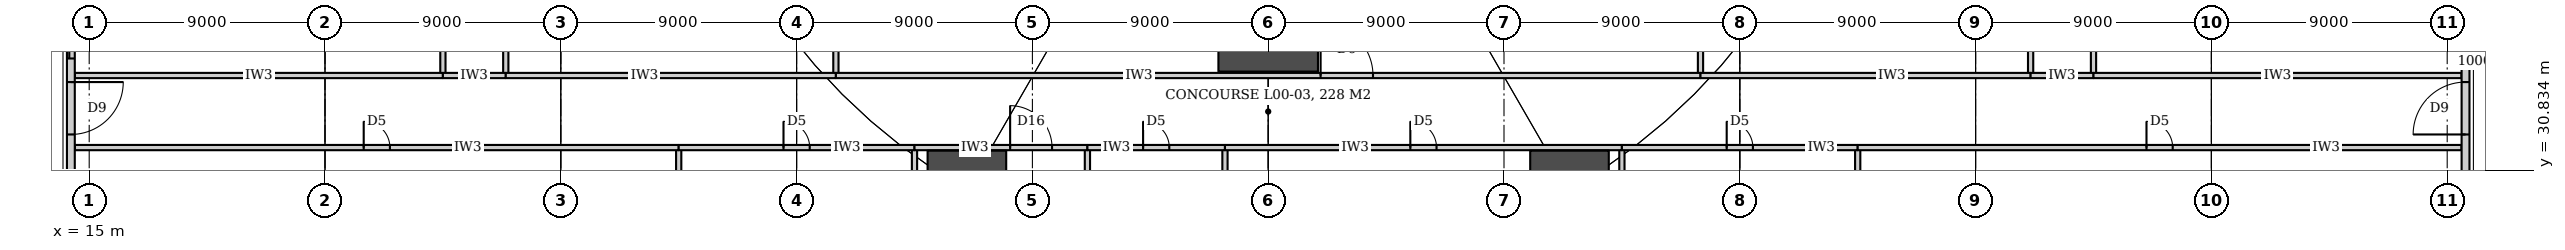
"""IFC4 building model, lengths in metres.
Left out: names, types, materials, properties, quantities, classifications, styles, units other than length and angle.
Written with IfcOpenShell. Run it as: python <this file> out.ifc"""

import sys

from ifc_helpers import new_model, si_unit, direction, frame, frame_2d, origin, origin_2d, place, context, subcontext, project, spatial, rectangle, circle, extrude, element, fill, save


model = new_model("IFC4")
c1 = context("Model", 3, precision=1e-05, world=origin(), true_north=direction((0.0, 1.0)))
c2 = subcontext(c1, "Body", "Model", "MODEL_VIEW")
j1 = project(units=[si_unit("LENGTHUNIT", "METRE"), si_unit("PLANEANGLEUNIT", "RADIAN")], contexts=[c1])
p1 = place(None, origin())
s1 = spatial("IfcSite", under=j1, at=p1, CompositionType="ELEMENT")
p2 = place(p1, origin())
s2 = spatial("IfcBuilding", under=s1, at=p2, CompositionType="ELEMENT")
p3 = place(p2, origin())
s3 = spatial("IfcBuildingStorey", under=s2, at=p3, CompositionType="ELEMENT", Elevation=0.0)
for number, where, z_axis, x_axis in (
    (1, (48.5, 30.081, 0.0), (0.0, 0.0, 1.0), (1.0, 0.0, 0.0)),
    (2, (71.5, 30.081, 0.0), (0.0, 0.0, 1.0), (1.0, 0.0, 0.0)),
):
    element("IfcColumn", number, at=place(p3, frame(where, z_axis=z_axis, x_axis=x_axis)), inside=s3, PredefinedType="COLUMN", context=c2, shape_type="SweptSolid", body=[
        extrude(circle(Radius=1.5, at=origin_2d()), origin(), (0.0, 0.0, 1.0), 6.0),
    ])
p4 = place(p3, frame((60.0, 36.5, 0.0), z_axis=(0.0, 0.0, 1.0), x_axis=(1.0, 0.0, 0.0)))
e3 = element("IfcColumn", 3, at=p4, inside=s3, PredefinedType="COLUMN", context=c2, shape_type="SweptSolid", body=[
    extrude(circle(Radius=1.9, at=origin_2d()), origin(), (0.0, 0.0, 1.0), 6.0),
])
p5 = place(p3, frame((28.5, 34.45, 0.0), z_axis=(0.0, 0.0, 1.0), x_axis=(0.0, 1.0, 0.0)))
e4 = element("IfcWall", 4, at=p5, inside=s3, PredefinedType="PARTITIONING", context=c2, shape_type="SweptSolid", body=[
    extrude(rectangle(XDim=31.65, YDim=0.2, at=frame_2d((15.825, 0.0))), origin(), (0.0, 0.0, 1.0), 3.68),
])
p6 = place(p5, frame((15.325, 0.0, 0.0)))
e5 = element("IfcOpeningElement", 5, at=p6, cuts=e4, PredefinedType="OPENING", context=c2, shape_type="SweptSolid", body=[
    extrude(rectangle(XDim=1.0, YDim=2.1, at=frame_2d((0.5, 1.05))), frame((0.0, 0.11, 0.0), z_axis=(0.0, -1.0, 0.0), x_axis=(1.0, 0.0, 0.0)), (0.0, 0.0, 1.0), 0.22),
])
p7 = place(p3, frame((30.9, 34.45, 0.0), z_axis=(0.0, 0.0, 1.0), x_axis=(0.0, 1.0, 0.0)))
e6 = element("IfcWall", 6, at=p7, inside=s3, PredefinedType="PARTITIONING", context=c2, shape_type="SweptSolid", body=[
    extrude(rectangle(XDim=13.9, YDim=0.2, at=frame_2d((6.95, 0.0))), origin(), (0.0, 0.0, 1.0), 3.68),
])
p8 = place(p7, frame((6.45, 0.0, 0.0)))
e7 = element("IfcOpeningElement", 7, at=p8, cuts=e6, PredefinedType="OPENING", context=c2, shape_type="SweptSolid", body=[
    extrude(rectangle(XDim=1.0, YDim=2.1, at=frame_2d((0.5, 1.05))), frame((0.0, 0.11, 0.0), z_axis=(0.0, -1.0, 0.0), x_axis=(1.0, 0.0, 0.0)), (0.0, 0.0, 1.0), 0.22),
])
p9 = place(p3, frame((37.5, 19.335, 0.0), z_axis=(0.0, 0.0, 1.0), x_axis=(0.0, 1.0, 0.0)))
e8 = element("IfcWall", 8, at=p9, inside=s3, PredefinedType="PARTITIONING", context=c2, shape_type="SweptSolid", body=[
    extrude(rectangle(XDim=12.365, YDim=0.2, at=frame_2d((6.183, 0.0))), origin(), (0.0, 0.0, 1.0), 3.68),
])
p10 = place(p3, frame((43.5, 34.45, 0.0), z_axis=(0.0, 0.0, 1.0), x_axis=(0.0, 1.0, 0.0)))
e9 = element("IfcWall", 9, at=p10, inside=s3, PredefinedType="PARTITIONING", context=c2, shape_type="SweptSolid", body=[
    extrude(rectangle(XDim=13.9, YDim=0.2, at=frame_2d((6.95, 0.0))), origin(), (0.0, 0.0, 1.0), 3.08),
])
p11 = place(p3, frame((46.5, 19.335, 0.0), z_axis=(0.0, 0.0, 1.0), x_axis=(0.0, 1.0, 0.0)))
e10 = element("IfcWall", 10, at=p11, inside=s3, PredefinedType="PARTITIONING", context=c2, shape_type="SweptSolid", body=[
    extrude(rectangle(XDim=12.365, YDim=0.2, at=frame_2d((6.183, 0.0))), origin(), (0.0, 0.0, 1.0), 3.68),
])
for number, where, z_axis, x_axis in (
    (11, (53.1, 19.455, 0.0), (0.0, 0.0, 1.0), (0.0, 1.0, 0.0)),
    (12, (58.35, 19.455, 0.0), (0.0, 0.0, 1.0), (0.0, 1.0, 0.0)),
):
    element("IfcWall", number, at=place(p3, frame(where, z_axis=z_axis, x_axis=x_axis)), inside=s3, PredefinedType="PARTITIONING", context=c2, shape_type="SweptSolid", body=[
        extrude(rectangle(XDim=12.245, YDim=0.2, at=frame_2d((6.123, 0.0))), origin(), (0.0, 0.0, 1.0), 3.68),
    ])
p12 = place(p3, frame((73.5, 19.335, 0.0), z_axis=(0.0, 0.0, 1.0), x_axis=(0.0, 1.0, 0.0)))
e13 = element("IfcWall", 13, at=p12, inside=s3, PredefinedType="PARTITIONING", context=c2, shape_type="SweptSolid", body=[
    extrude(rectangle(XDim=12.365, YDim=0.2, at=frame_2d((6.183, 0.0))), origin(), (0.0, 0.0, 1.0), 3.68),
])
p13 = place(p3, frame((76.5, 34.45, 0.0), z_axis=(0.0, 0.0, 1.0), x_axis=(0.0, 1.0, 0.0)))
e14 = element("IfcWall", 14, at=p13, inside=s3, PredefinedType="PARTITIONING", context=c2, shape_type="SweptSolid", body=[
    extrude(rectangle(XDim=13.9, YDim=0.2, at=frame_2d((6.95, 0.0))), origin(), (0.0, 0.0, 1.0), 3.08),
])
p14 = place(p3, frame((82.5, 19.335, 0.0), z_axis=(0.0, 0.0, 1.0), x_axis=(0.0, 1.0, 0.0)))
e15 = element("IfcWall", 15, at=p14, inside=s3, PredefinedType="PARTITIONING", context=c2, shape_type="SweptSolid", body=[
    extrude(rectangle(XDim=12.365, YDim=0.2, at=frame_2d((6.183, 0.0))), origin(), (0.0, 0.0, 1.0), 3.68),
])
p15 = place(p3, frame((89.1, 34.45, 0.0), z_axis=(0.0, 0.0, 1.0), x_axis=(0.0, 1.0, 0.0)))
e16 = element("IfcWall", 16, at=p15, inside=s3, PredefinedType="PARTITIONING", context=c2, shape_type="SweptSolid", body=[
    extrude(rectangle(XDim=13.9, YDim=0.2, at=frame_2d((6.95, 0.0))), origin(), (0.0, 0.0, 1.0), 3.68),
])
p16 = place(p15, frame((6.45, 0.0, 0.0)))
e17 = element("IfcOpeningElement", 17, at=p16, cuts=e16, PredefinedType="OPENING", context=c2, shape_type="SweptSolid", body=[
    extrude(rectangle(XDim=1.0, YDim=2.1, at=frame_2d((0.5, 1.05))), frame((0.0, 0.11, 0.0), z_axis=(0.0, -1.0, 0.0), x_axis=(1.0, 0.0, 0.0)), (0.0, 0.0, 1.0), 0.22),
])
p17 = place(p3, frame((91.5, 34.45, 0.0), z_axis=(0.0, 0.0, 1.0), x_axis=(0.0, 1.0, 0.0)))
e18 = element("IfcWall", 18, at=p17, inside=s3, PredefinedType="PARTITIONING", context=c2, shape_type="SweptSolid", body=[
    extrude(rectangle(XDim=33.85, YDim=0.2, at=frame_2d((16.925, 0.0))), origin(), (0.0, 0.0, 1.0), 3.68),
])
p18 = place(p17, frame((15.725, 0.0, 0.0)))
e19 = element("IfcOpeningElement", 19, at=p18, cuts=e18, PredefinedType="OPENING", context=c2, shape_type="SweptSolid", body=[
    extrude(rectangle(XDim=2.4, YDim=2.7, at=frame_2d((1.2, 1.35))), frame((0.0, 0.11, 0.0), z_axis=(0.0, -1.0, 0.0), x_axis=(1.0, 0.0, 0.0)), (0.0, 0.0, 1.0), 0.22),
])
p19 = place(p3, frame((14.455, 31.7, 0.0), z_axis=(0.0, 0.0, 1.0), x_axis=(1.0, 0.0, 0.0)))
e20 = element("IfcWall", 20, at=p19, inside=s3, PredefinedType="PARTITIONING", context=c2, shape_type="SweptSolid", body=[
    extrude(rectangle(XDim=23.045, YDim=0.2, at=frame_2d((11.522, 0.0))), origin(), (0.0, 0.0, 1.0), 3.68),
])
p20 = place(p19, frame((11.022, 0.0, 0.0)))
e21 = element("IfcOpeningElement", 21, at=p20, cuts=e20, PredefinedType="OPENING", context=c2, shape_type="SweptSolid", body=[
    extrude(rectangle(XDim=1.0, YDim=2.1, at=frame_2d((0.5, 1.05))), frame((0.0, 0.11, 0.0), z_axis=(0.0, -1.0, 0.0), x_axis=(1.0, 0.0, 0.0)), (0.0, 0.0, 1.0), 0.22),
])
p21 = place(p3, frame((37.5, 31.7, 0.0), z_axis=(0.0, 0.0, 1.0), x_axis=(1.0, 0.0, 0.0)))
e22 = element("IfcWall", 22, at=p21, inside=s3, PredefinedType="PARTITIONING", context=c2, shape_type="SweptSolid", body=[
    extrude(rectangle(XDim=9.0, YDim=0.2, at=frame_2d((4.5, 0.0))), origin(), (0.0, 0.0, 1.0), 3.68),
])
p22 = place(p21, frame((4.0, 0.0, 0.0)))
e23 = element("IfcOpeningElement", 23, at=p22, cuts=e22, PredefinedType="OPENING", context=c2, shape_type="SweptSolid", body=[
    extrude(rectangle(XDim=1.0, YDim=2.1, at=frame_2d((0.5, 1.05))), frame((0.0, 0.11, 0.0), z_axis=(0.0, -1.0, 0.0), x_axis=(1.0, 0.0, 0.0)), (0.0, 0.0, 1.0), 0.22),
])
p23 = place(p3, frame((46.5, 31.7, 0.0), z_axis=(0.0, 0.0, 1.0), x_axis=(1.0, 0.0, 0.0)))
e24 = element("IfcWall", 24, at=p23, inside=s3, PredefinedType="PARTITIONING", context=c2, shape_type="SweptSolid", body=[
    extrude(rectangle(XDim=6.6, YDim=0.2, at=frame_2d((3.3, 0.0))), origin(), (0.0, 0.0, 1.0), 3.08),
])
p24 = place(p23, frame((3.65, 0.0, 0.0)))
e25 = element("IfcOpeningElement", 25, at=p24, cuts=e24, PredefinedType="OPENING", context=c2, shape_type="SweptSolid", body=[
    extrude(rectangle(XDim=1.6, YDim=2.4, at=frame_2d((0.8, 1.2))), frame((0.0, 0.11, 0.0), z_axis=(0.0, -1.0, 0.0), x_axis=(1.0, 0.0, 0.0)), (0.0, 0.0, 1.0), 0.22),
])
p25 = place(p3, frame((53.1, 31.7, 0.0), z_axis=(0.0, 0.0, 1.0), x_axis=(1.0, 0.0, 0.0)))
e26 = element("IfcWall", 26, at=p25, inside=s3, PredefinedType="PARTITIONING", context=c2, shape_type="SweptSolid", body=[
    extrude(rectangle(XDim=5.25, YDim=0.2, at=frame_2d((2.625, 0.0))), origin(), (0.0, 0.0, 1.0), 3.68),
])
p26 = place(p25, frame((2.125, 0.0, 0.0)))
e27 = element("IfcOpeningElement", 27, at=p26, cuts=e26, PredefinedType="OPENING", context=c2, shape_type="SweptSolid", body=[
    extrude(rectangle(XDim=1.0, YDim=2.1, at=frame_2d((0.5, 1.05))), frame((0.0, 0.11, 0.0), z_axis=(0.0, -1.0, 0.0), x_axis=(1.0, 0.0, 0.0)), (0.0, 0.0, 1.0), 0.22),
])
p27 = place(p3, frame((58.35, 31.7, 0.0), z_axis=(0.0, 0.0, 1.0), x_axis=(1.0, 0.0, 0.0)))
e28 = element("IfcWall", 28, at=p27, inside=s3, PredefinedType="PARTITIONING", context=c2, shape_type="SweptSolid", body=[
    extrude(rectangle(XDim=15.15, YDim=0.2, at=frame_2d((7.575, 0.0))), origin(), (0.0, 0.0, 1.0), 3.08),
])
p28 = place(p27, frame((7.075, 0.0, 0.0)))
e29 = element("IfcOpeningElement", 29, at=p28, cuts=e28, PredefinedType="OPENING", context=c2, shape_type="SweptSolid", body=[
    extrude(rectangle(XDim=1.0, YDim=2.1, at=frame_2d((0.5, 1.05))), frame((0.0, 0.11, 0.0), z_axis=(0.0, -1.0, 0.0), x_axis=(1.0, 0.0, 0.0)), (0.0, 0.0, 1.0), 0.22),
])
p29 = place(p3, frame((73.5, 31.7, 0.0), z_axis=(0.0, 0.0, 1.0), x_axis=(1.0, 0.0, 0.0)))
e30 = element("IfcWall", 30, at=p29, inside=s3, PredefinedType="PARTITIONING", context=c2, shape_type="SweptSolid", body=[
    extrude(rectangle(XDim=9.0, YDim=0.2, at=frame_2d((4.5, 0.0))), origin(), (0.0, 0.0, 1.0), 3.68),
])
p30 = place(p29, frame((4.0, 0.0, 0.0)))
e31 = element("IfcOpeningElement", 31, at=p30, cuts=e30, PredefinedType="OPENING", context=c2, shape_type="SweptSolid", body=[
    extrude(rectangle(XDim=1.0, YDim=2.1, at=frame_2d((0.5, 1.05))), frame((0.0, 0.11, 0.0), z_axis=(0.0, -1.0, 0.0), x_axis=(1.0, 0.0, 0.0)), (0.0, 0.0, 1.0), 0.22),
])
p31 = place(p3, frame((82.5, 31.7, 0.0), z_axis=(0.0, 0.0, 1.0), x_axis=(1.0, 0.0, 0.0)))
e32 = element("IfcWall", 32, at=p31, inside=s3, PredefinedType="PARTITIONING", context=c2, shape_type="SweptSolid", body=[
    extrude(rectangle(XDim=23.045, YDim=0.2, at=frame_2d((11.522, 0.0))), origin(), (0.0, 0.0, 1.0), 3.68),
])
p32 = place(p31, frame((11.022, 0.0, 0.0)))
e33 = element("IfcOpeningElement", 33, at=p32, cuts=e32, PredefinedType="OPENING", context=c2, shape_type="SweptSolid", body=[
    extrude(rectangle(XDim=1.0, YDim=2.1, at=frame_2d((0.5, 1.05))), frame((0.0, 0.11, 0.0), z_axis=(0.0, -1.0, 0.0), x_axis=(1.0, 0.0, 0.0)), (0.0, 0.0, 1.0), 0.22),
])
p33 = place(p3, frame((14.455, 34.45, 0.0), z_axis=(0.0, 0.0, 1.0), x_axis=(1.0, 0.0, 0.0)))
e34 = element("IfcWall", 34, at=p33, inside=s3, PredefinedType="PARTITIONING", context=c2, shape_type="SweptSolid", body=[
    extrude(rectangle(XDim=14.045, YDim=0.2, at=frame_2d((7.022, 0.0))), origin(), (0.0, 0.0, 1.0), 3.68),
])
p34 = place(p3, frame((28.5, 34.45, 0.0), z_axis=(0.0, 0.0, 1.0), x_axis=(1.0, 0.0, 0.0)))
e35 = element("IfcWall", 35, at=p34, inside=s3, PredefinedType="PARTITIONING", context=c2, shape_type="SweptSolid", body=[
    extrude(rectangle(XDim=2.4, YDim=0.2, at=frame_2d((1.2, 0.0))), origin(), (0.0, 0.0, 1.0), 3.68),
])
p35 = place(p3, frame((30.9, 34.45, 0.0), z_axis=(0.0, 0.0, 1.0), x_axis=(1.0, 0.0, 0.0)))
e36 = element("IfcWall", 36, at=p35, inside=s3, PredefinedType="PARTITIONING", context=c2, shape_type="SweptSolid", body=[
    extrude(rectangle(XDim=12.6, YDim=0.2, at=frame_2d((6.3, 0.0))), origin(), (0.0, 0.0, 1.0), 3.68),
])
p36 = place(p3, frame((43.5, 34.45, 0.0), z_axis=(0.0, 0.0, 1.0), x_axis=(1.0, 0.0, 0.0)))
e37 = element("IfcWall", 37, at=p36, inside=s3, PredefinedType="PARTITIONING", context=c2, shape_type="SweptSolid", body=[
    extrude(rectangle(XDim=33.0, YDim=0.2, at=frame_2d((16.5, 0.0))), origin(), (0.0, 0.0, 1.0), 3.08),
])
p37 = place(p36, frame((18.5, 0.0, 0.0)))
e38 = element("IfcOpeningElement", 38, at=p37, cuts=e37, PredefinedType="OPENING", context=c2, shape_type="SweptSolid", body=[
    extrude(rectangle(XDim=2.0, YDim=2.1, at=frame_2d((1.0, 1.05))), frame((0.0, 0.11, 0.0), z_axis=(0.0, -1.0, 0.0), x_axis=(1.0, 0.0, 0.0)), (0.0, 0.0, 1.0), 0.22),
])
p38 = place(p3, frame((76.5, 34.45, 0.0), z_axis=(0.0, 0.0, 1.0), x_axis=(1.0, 0.0, 0.0)))
e39 = element("IfcWall", 39, at=p38, inside=s3, PredefinedType="PARTITIONING", context=c2, shape_type="SweptSolid", body=[
    extrude(rectangle(XDim=12.6, YDim=0.2, at=frame_2d((6.3, 0.0))), origin(), (0.0, 0.0, 1.0), 3.68),
])
p39 = place(p3, frame((89.1, 34.45, 0.0), z_axis=(0.0, 0.0, 1.0), x_axis=(1.0, 0.0, 0.0)))
e40 = element("IfcWall", 40, at=p39, inside=s3, PredefinedType="PARTITIONING", context=c2, shape_type="SweptSolid", body=[
    extrude(rectangle(XDim=2.4, YDim=0.2, at=frame_2d((1.2, 0.0))), origin(), (0.0, 0.0, 1.0), 3.68),
])
p40 = place(p3, frame((91.5, 34.45, 0.0), z_axis=(0.0, 0.0, 1.0), x_axis=(1.0, 0.0, 0.0)))
e41 = element("IfcWall", 41, at=p40, inside=s3, PredefinedType="PARTITIONING", context=c2, shape_type="SweptSolid", body=[
    extrude(rectangle(XDim=14.045, YDim=0.2, at=frame_2d((7.022, 0.0))), origin(), (0.0, 0.0, 1.0), 3.68),
])
p41 = place(p3, frame((105.7, 30.0, 0.0), z_axis=(0.0, 0.0, 1.0), x_axis=(0.0, 1.0, 0.0)))
e42 = element("IfcWall", 42, at=p41, inside=s3, PredefinedType="SOLIDWALL", context=c2, shape_type="SweptSolid", body=[
    extrude(rectangle(XDim=40.0, YDim=0.3, at=frame_2d((20.0, 0.0))), origin(), (0.0, 0.0, 1.0), 5.7),
])
p42 = place(p41, frame((5.1, 0.0, 0.0)))
e43 = element("IfcOpeningElement", 43, at=p42, cuts=e42, PredefinedType="OPENING", context=c2, shape_type="SweptSolid", body=[
    extrude(rectangle(XDim=3.0, YDim=3.0, at=frame_2d((1.5, 1.5))), frame((0.0, 0.16, 0.0), z_axis=(0.0, -1.0, 0.0), x_axis=(1.0, 0.0, 0.0)), (0.0, 0.0, 1.0), 0.32),
])
p43 = place(p41, frame((2.2, 0.0, 0.0)))
e44 = element("IfcOpeningElement", 44, at=p43, cuts=e42, PredefinedType="OPENING", context=c2, shape_type="SweptSolid", body=[
    extrude(rectangle(XDim=2.0, YDim=3.0, at=frame_2d((1.0, 1.5))), frame((0.0, 0.16, 0.0), z_axis=(0.0, -1.0, 0.0), x_axis=(1.0, 0.0, 0.0)), (0.0, 0.0, 1.0), 0.32),
])
p44 = place(p41, frame((11.4, 0.0, 0.6)))
e45 = element("IfcOpeningElement", 45, at=p44, cuts=e42, PredefinedType="OPENING", context=c2, shape_type="SweptSolid", body=[
    extrude(rectangle(XDim=7.2, YDim=3.6, at=frame_2d((3.6, 1.8))), frame((0.0, 0.16, 0.0), z_axis=(0.0, -1.0, 0.0), x_axis=(1.0, 0.0, 0.0)), (0.0, 0.0, 1.0), 0.32),
])
p45 = place(p41, frame((21.4, 0.0, 0.6)))
e46 = element("IfcOpeningElement", 46, at=p45, cuts=e42, PredefinedType="OPENING", context=c2, shape_type="SweptSolid", body=[
    extrude(rectangle(XDim=7.2, YDim=3.6, at=frame_2d((3.6, 1.8))), frame((0.0, 0.16, 0.0), z_axis=(0.0, -1.0, 0.0), x_axis=(1.0, 0.0, 0.0)), (0.0, 0.0, 1.0), 0.32),
])
p46 = place(p41, frame((31.4, 0.0, 0.6)))
e47 = element("IfcOpeningElement", 47, at=p46, cuts=e42, PredefinedType="OPENING", context=c2, shape_type="SweptSolid", body=[
    extrude(rectangle(XDim=7.2, YDim=3.6, at=frame_2d((3.6, 1.8))), frame((0.0, 0.16, 0.0), z_axis=(0.0, -1.0, 0.0), x_axis=(1.0, 0.0, 0.0)), (0.0, 0.0, 1.0), 0.32),
])
p47 = place(p3, frame((14.3, 40.0, 0.0), z_axis=(0.0, 0.0, 1.0), x_axis=(0.0, -1.0, 0.0)))
e48 = element("IfcWall", 48, at=p47, inside=s3, PredefinedType="SOLIDWALL", context=c2, shape_type="SweptSolid", body=[
    extrude(rectangle(XDim=10.0, YDim=0.3, at=frame_2d((5.0, 0.0))), origin(), (0.0, 0.0, 1.0), 5.7),
])
p48 = place(p47, frame((1.9, 0.0, 0.0)))
e49 = element("IfcOpeningElement", 49, at=p48, cuts=e48, PredefinedType="OPENING", context=c2, shape_type="SweptSolid", body=[
    extrude(rectangle(XDim=3.0, YDim=3.0, at=frame_2d((1.5, 1.5))), frame((0.0, 0.16, 0.0), z_axis=(0.0, -1.0, 0.0), x_axis=(1.0, 0.0, 0.0)), (0.0, 0.0, 1.0), 0.32),
])
p49 = place(p47, frame((5.8, 0.0, 0.0)))
e50 = element("IfcOpeningElement", 50, at=p49, cuts=e48, PredefinedType="OPENING", context=c2, shape_type="SweptSolid", body=[
    extrude(rectangle(XDim=2.0, YDim=3.0, at=frame_2d((1.0, 1.5))), frame((0.0, 0.16, 0.0), z_axis=(0.0, -1.0, 0.0), x_axis=(1.0, 0.0, 0.0)), (0.0, 0.0, 1.0), 0.32),
])
p50 = place(p37, origin())
e51 = element("IfcDoor", 51, at=p50, inside=s3, OperationType="DOUBLE_DOOR_DOUBLE_SWING", PredefinedType="DOOR", context=c2, shape_type="SweptSolid", body=[
    extrude(rectangle(XDim=2.0, YDim=2.1, at=frame_2d((1.0, 1.05))), frame((0.0, 0.025, 0.0), z_axis=(0.0, -1.0, 0.0), x_axis=(1.0, 0.0, 0.0)), (0.0, 0.0, 1.0), 0.05),
])
fill(e38, e51)
p51 = place(p20, origin())
e52 = element("IfcDoor", 52, at=p51, inside=s3, OperationType="SINGLE_SWING_LEFT", PredefinedType="DOOR", context=c2, shape_type="SweptSolid", body=[
    extrude(rectangle(XDim=1.0, YDim=2.1, at=frame_2d((0.5, 1.05))), frame((0.0, 0.025, 0.0), z_axis=(0.0, -1.0, 0.0), x_axis=(1.0, 0.0, 0.0)), (0.0, 0.0, 1.0), 0.05),
])
fill(e21, e52)
p52 = place(p22, origin())
e53 = element("IfcDoor", 53, at=p52, inside=s3, OperationType="SINGLE_SWING_LEFT", PredefinedType="DOOR", context=c2, shape_type="SweptSolid", body=[
    extrude(rectangle(XDim=1.0, YDim=2.1, at=frame_2d((0.5, 1.05))), frame((0.0, 0.025, 0.0), z_axis=(0.0, -1.0, 0.0), x_axis=(1.0, 0.0, 0.0)), (0.0, 0.0, 1.0), 0.05),
])
fill(e23, e53)
p53 = place(p24, origin())
e54 = element("IfcDoor", 54, at=p53, inside=s3, OperationType="DOUBLE_DOOR_DOUBLE_SWING", PredefinedType="DOOR", context=c2, shape_type="SweptSolid", body=[
    extrude(rectangle(XDim=1.6, YDim=2.4, at=frame_2d((0.8, 1.2))), frame((0.0, 0.025, 0.0), z_axis=(0.0, -1.0, 0.0), x_axis=(1.0, 0.0, 0.0)), (0.0, 0.0, 1.0), 0.05),
])
fill(e25, e54)
p54 = place(p26, origin())
e55 = element("IfcDoor", 55, at=p54, inside=s3, OperationType="SINGLE_SWING_LEFT", PredefinedType="DOOR", context=c2, shape_type="SweptSolid", body=[
    extrude(rectangle(XDim=1.0, YDim=2.1, at=frame_2d((0.5, 1.05))), frame((0.0, 0.025, 0.0), z_axis=(0.0, -1.0, 0.0), x_axis=(1.0, 0.0, 0.0)), (0.0, 0.0, 1.0), 0.05),
])
fill(e27, e55)
p55 = place(p28, origin())
e56 = element("IfcDoor", 56, at=p55, inside=s3, OperationType="SINGLE_SWING_LEFT", PredefinedType="DOOR", context=c2, shape_type="SweptSolid", body=[
    extrude(rectangle(XDim=1.0, YDim=2.1, at=frame_2d((0.5, 1.05))), frame((0.0, 0.025, 0.0), z_axis=(0.0, -1.0, 0.0), x_axis=(1.0, 0.0, 0.0)), (0.0, 0.0, 1.0), 0.05),
])
fill(e29, e56)
p56 = place(p30, origin())
e57 = element("IfcDoor", 57, at=p56, inside=s3, OperationType="SINGLE_SWING_LEFT", PredefinedType="DOOR", context=c2, shape_type="SweptSolid", body=[
    extrude(rectangle(XDim=1.0, YDim=2.1, at=frame_2d((0.5, 1.05))), frame((0.0, 0.025, 0.0), z_axis=(0.0, -1.0, 0.0), x_axis=(1.0, 0.0, 0.0)), (0.0, 0.0, 1.0), 0.05),
])
fill(e31, e57)
p57 = place(p32, origin())
e58 = element("IfcDoor", 58, at=p57, inside=s3, OperationType="SINGLE_SWING_LEFT", PredefinedType="DOOR", context=c2, shape_type="SweptSolid", body=[
    extrude(rectangle(XDim=1.0, YDim=2.1, at=frame_2d((0.5, 1.05))), frame((0.0, 0.025, 0.0), z_axis=(0.0, -1.0, 0.0), x_axis=(1.0, 0.0, 0.0)), (0.0, 0.0, 1.0), 0.05),
])
fill(e33, e58)
p58 = place(p42, origin())
e59 = element("IfcDoor", 59, at=p58, inside=s3, OperationType="DOUBLE_DOOR_SLIDING", PredefinedType="DOOR", context=c2, shape_type="SweptSolid", body=[
    extrude(rectangle(XDim=3.0, YDim=3.0, at=frame_2d((1.5, 1.5))), frame((0.0, 0.025, 0.0), z_axis=(0.0, -1.0, 0.0), x_axis=(1.0, 0.0, 0.0)), (0.0, 0.0, 1.0), 0.05),
])
fill(e43, e59)
p59 = place(p43, origin())
e60 = element("IfcDoor", 60, at=p59, inside=s3, OperationType="DOUBLE_DOOR_DOUBLE_SWING", PredefinedType="DOOR", context=c2, shape_type="SweptSolid", body=[
    extrude(rectangle(XDim=2.0, YDim=3.0, at=frame_2d((1.0, 1.5))), frame((0.0, 0.025, 0.0), z_axis=(0.0, -1.0, 0.0), x_axis=(1.0, 0.0, 0.0)), (0.0, 0.0, 1.0), 0.05),
])
fill(e44, e60)
p60 = place(p48, origin())
e61 = element("IfcDoor", 61, at=p60, inside=s3, OperationType="DOUBLE_DOOR_SLIDING", PredefinedType="DOOR", context=c2, shape_type="SweptSolid", body=[
    extrude(rectangle(XDim=3.0, YDim=3.0, at=frame_2d((1.5, 1.5))), frame((0.0, 0.025, 0.0), z_axis=(0.0, -1.0, 0.0), x_axis=(1.0, 0.0, 0.0)), (0.0, 0.0, 1.0), 0.05),
])
fill(e49, e61)
p61 = place(p49, origin())
e62 = element("IfcDoor", 62, at=p61, inside=s3, OperationType="DOUBLE_DOOR_DOUBLE_SWING", PredefinedType="DOOR", context=c2, shape_type="SweptSolid", body=[
    extrude(rectangle(XDim=2.0, YDim=3.0, at=frame_2d((1.0, 1.5))), frame((0.0, 0.025, 0.0), z_axis=(0.0, -1.0, 0.0), x_axis=(1.0, 0.0, 0.0)), (0.0, 0.0, 1.0), 0.05),
])
fill(e50, e62)
save(model, sys.argv[1])
